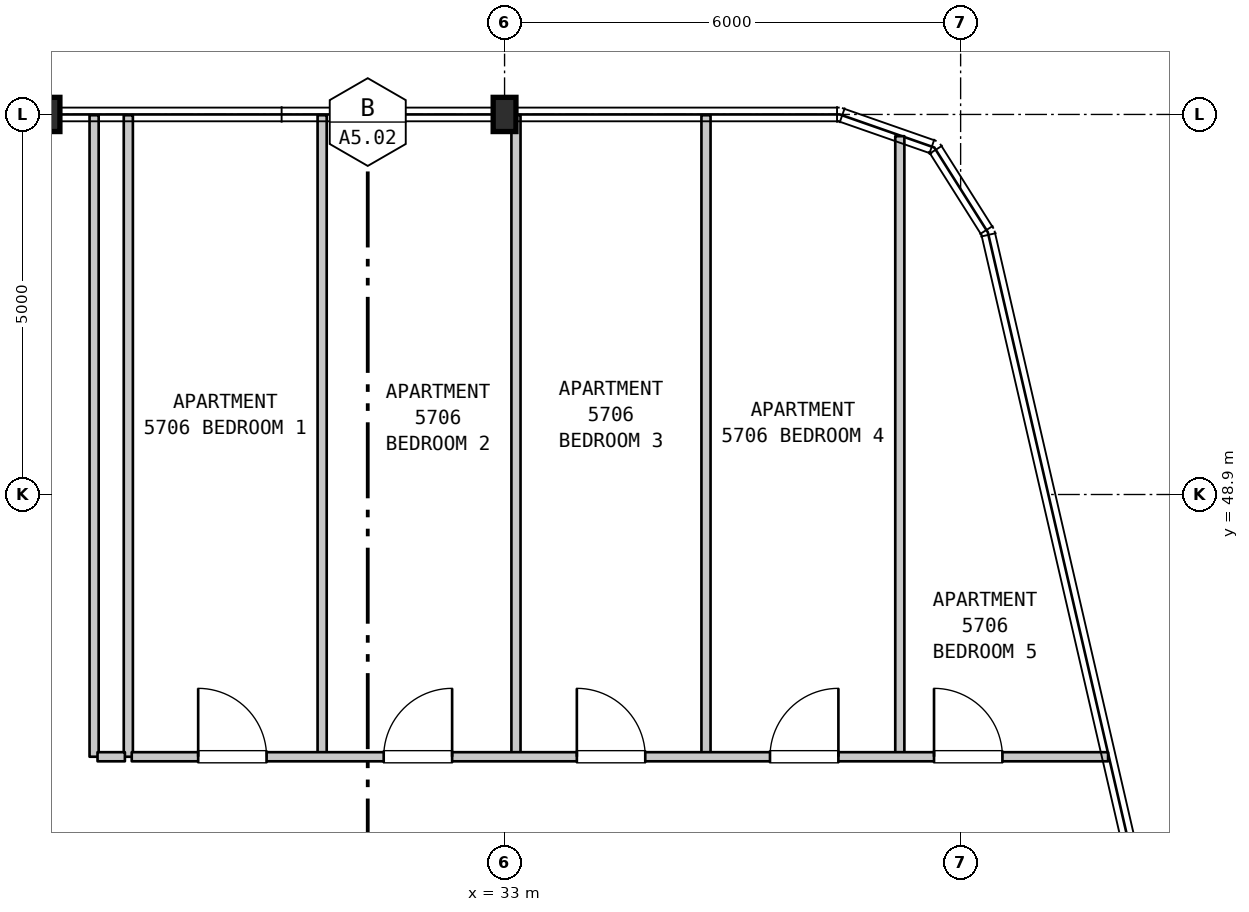
"""IFC4 building model, lengths in metres.
Left out: names, types, materials, properties, quantities, classifications, styles, units other than length and angle.
Written with IfcOpenShell. Run it as: python <this file> out.ifc"""

import sys

from ifc_helpers import new_model, si_unit, direction, frame, frame_2d, origin, origin_2d, place, context, subcontext, project, spatial, rectangle, i_section, extrude, element, fill, save


model = new_model("IFC4")
c1 = context("Model", 3, precision=1e-05, world=origin(), true_north=direction((0.0, 1.0)))
c2 = subcontext(c1, "Body", "Model", "MODEL_VIEW")
j1 = project(units=[si_unit("LENGTHUNIT", "METRE"), si_unit("PLANEANGLEUNIT", "RADIAN")], contexts=[c1])
p1 = place(None, origin())
s1 = spatial("IfcSite", under=j1, at=p1, CompositionType="ELEMENT")
p2 = place(p1, origin())
s2 = spatial("IfcBuilding", under=s1, at=p2, CompositionType="ELEMENT")
p3 = place(p2, frame((0.0, 0.0, 230.2)))
s3 = spatial("IfcBuildingStorey", under=s2, at=p3, CompositionType="ELEMENT", Elevation=230.2)
for number, where, z_axis, x_axis in (
    (1, (27.0, 53.9, 0.0), (0.0, 0.0, 1.0), (1.0, 0.0, 0.0)),
    (2, (33.0, 53.9, 0.0), (0.0, 0.0, 1.0), (1.0, 0.0, 0.0)),
):
    element("IfcColumn", number, at=place(p3, frame(where, z_axis=z_axis, x_axis=x_axis)), inside=s3, PredefinedType="COLUMN", context=c2, shape_type="SweptSolid", body=[
        extrude(i_section(OverallWidth=0.3, OverallDepth=0.45, WebThickness=0.014, FlangeThickness=0.026, FilletRadius=0.027, at=origin_2d()), origin(), (0.0, 0.0, 1.0), 3.7),
    ])
for number, where, z_axis, x_axis in (
    (3, (27.6, 45.45, 0.0), (0.0, 0.0, 1.0), (0.0, 1.0, 0.0)),
    (4, (28.05, 45.45, 0.0), (0.0, 0.0, 1.0), (0.0, 1.0, 0.0)),
    (5, (30.6, 45.45, 0.0), (0.0, 0.0, 1.0), (0.0, 1.0, 0.0)),
):
    element("IfcWall", number, at=place(p3, frame(where, z_axis=z_axis, x_axis=x_axis)), inside=s3, PredefinedType="PARTITIONING", context=c2, shape_type="SweptSolid", body=[
        extrude(rectangle(XDim=8.44, YDim=0.12, at=frame_2d((4.22, 0.0))), origin(), (0.0, 0.0, 1.0), 3.39),
    ])
p4 = place(p3, frame((33.15, 45.45, 0.0), z_axis=(0.0, 0.0, 1.0), x_axis=(0.0, 1.0, 0.0)))
e6 = element("IfcWall", 6, at=p4, inside=s3, PredefinedType="PARTITIONING", context=c2, shape_type="SweptSolid", body=[
    extrude(rectangle(XDim=8.44, YDim=0.12, at=frame_2d((4.22, 0.0))), origin(), (0.0, 0.0, 1.0), 2.79),
])
p5 = place(p3, frame((35.65, 45.45, 0.0), z_axis=(0.0, 0.0, 1.0), x_axis=(0.0, 1.0, 0.0)))
e7 = element("IfcWall", 7, at=p5, inside=s3, PredefinedType="PARTITIONING", context=c2, shape_type="SweptSolid", body=[
    extrude(rectangle(XDim=8.44, YDim=0.12, at=frame_2d((4.22, 0.0))), origin(), (0.0, 0.0, 1.0), 3.39),
])
p6 = place(p3, frame((38.2, 45.45, 0.0), z_axis=(0.0, 0.0, 1.0), x_axis=(0.0, 1.0, 0.0)))
e8 = element("IfcWall", 8, at=p6, inside=s3, PredefinedType="PARTITIONING", context=c2, shape_type="SweptSolid", body=[
    extrude(rectangle(XDim=8.164, YDim=0.12, at=frame_2d((4.082, 0.0))), origin(), (0.0, 0.0, 1.0), 3.39),
])
p7 = place(p3, frame((27.645, 45.45, 0.0), z_axis=(0.0, 0.0, 1.0), x_axis=(1.0, 0.0, 0.0)))
e9 = element("IfcWall", 9, at=p7, inside=s3, PredefinedType="PARTITIONING", context=c2, shape_type="SweptSolid", body=[
    extrude(rectangle(XDim=0.36, YDim=0.12, at=frame_2d((0.18, 0.0))), origin(), (0.0, 0.0, 1.0), 3.39),
])
p8 = place(p3, frame((28.095, 45.45, 0.0), z_axis=(0.0, 0.0, 1.0), x_axis=(1.0, 0.0, 0.0)))
e10 = element("IfcWall", 10, at=p8, inside=s3, PredefinedType="PARTITIONING", context=c2, shape_type="SweptSolid", body=[
    extrude(rectangle(XDim=12.845, YDim=0.12, at=frame_2d((6.422, 0.0))), origin(), (0.0, 0.0, 1.0), 3.39),
])
p9 = place(p8, frame((0.874, 0.0, 0.0)))
e11 = element("IfcOpeningElement", 11, at=p9, cuts=e10, PredefinedType="OPENING", context=c2, shape_type="SweptSolid", body=[
    extrude(rectangle(XDim=0.9, YDim=2.15, at=frame_2d((0.45, 1.075))), frame((0.0, 0.07, 0.0), z_axis=(0.0, -1.0, 0.0), x_axis=(1.0, 0.0, 0.0)), (0.0, 0.0, 1.0), 0.14),
])
p10 = place(p8, frame((3.315, 0.0, 0.0)))
e12 = element("IfcOpeningElement", 12, at=p10, cuts=e10, PredefinedType="OPENING", context=c2, shape_type="SweptSolid", body=[
    extrude(rectangle(XDim=0.9, YDim=2.15, at=frame_2d((0.45, 1.075))), frame((0.0, 0.07, 0.0), z_axis=(0.0, -1.0, 0.0), x_axis=(1.0, 0.0, 0.0)), (0.0, 0.0, 1.0), 0.14),
])
p11 = place(p8, frame((5.856, 0.0, 0.0)))
e13 = element("IfcOpeningElement", 13, at=p11, cuts=e10, PredefinedType="OPENING", context=c2, shape_type="SweptSolid", body=[
    extrude(rectangle(XDim=0.9, YDim=2.15, at=frame_2d((0.45, 1.075))), frame((0.0, 0.07, 0.0), z_axis=(0.0, -1.0, 0.0), x_axis=(1.0, 0.0, 0.0)), (0.0, 0.0, 1.0), 0.14),
])
p12 = place(p8, frame((8.397, 0.0, 0.0)))
e14 = element("IfcOpeningElement", 14, at=p12, cuts=e10, PredefinedType="OPENING", context=c2, shape_type="SweptSolid", body=[
    extrude(rectangle(XDim=0.9, YDim=2.15, at=frame_2d((0.45, 1.075))), frame((0.0, 0.07, 0.0), z_axis=(0.0, -1.0, 0.0), x_axis=(1.0, 0.0, 0.0)), (0.0, 0.0, 1.0), 0.14),
])
p13 = place(p8, frame((10.555, 0.0, 0.0)))
e15 = element("IfcOpeningElement", 15, at=p13, cuts=e10, PredefinedType="OPENING", context=c2, shape_type="SweptSolid", body=[
    extrude(rectangle(XDim=0.9, YDim=2.15, at=frame_2d((0.45, 1.075))), frame((0.0, 0.07, 0.0), z_axis=(0.0, -1.0, 0.0), x_axis=(1.0, 0.0, 0.0)), (0.0, 0.0, 1.0), 0.14),
])
p14 = place(p9, origin())
e16 = element("IfcDoor", 16, at=p14, inside=s3, OperationType="SINGLE_SWING_LEFT", PredefinedType="DOOR", context=c2, shape_type="SweptSolid", body=[
    extrude(rectangle(XDim=0.9, YDim=2.15, at=frame_2d((0.45, 1.075))), frame((0.0, 0.025, 0.0), z_axis=(0.0, -1.0, 0.0), x_axis=(1.0, 0.0, 0.0)), (0.0, 0.0, 1.0), 0.05),
])
fill(e11, e16)
p15 = place(p10, origin())
e17 = element("IfcDoor", 17, at=p15, inside=s3, OperationType="SINGLE_SWING_RIGHT", PredefinedType="DOOR", context=c2, shape_type="SweptSolid", body=[
    extrude(rectangle(XDim=0.9, YDim=2.15, at=frame_2d((0.45, 1.075))), frame((0.0, 0.025, 0.0), z_axis=(0.0, -1.0, 0.0), x_axis=(1.0, 0.0, 0.0)), (0.0, 0.0, 1.0), 0.05),
])
fill(e12, e17)
p16 = place(p11, origin())
e18 = element("IfcDoor", 18, at=p16, inside=s3, OperationType="SINGLE_SWING_LEFT", PredefinedType="DOOR", context=c2, shape_type="SweptSolid", body=[
    extrude(rectangle(XDim=0.9, YDim=2.15, at=frame_2d((0.45, 1.075))), frame((0.0, 0.025, 0.0), z_axis=(0.0, -1.0, 0.0), x_axis=(1.0, 0.0, 0.0)), (0.0, 0.0, 1.0), 0.05),
])
fill(e13, e18)
p17 = place(p12, origin())
e19 = element("IfcDoor", 19, at=p17, inside=s3, OperationType="SINGLE_SWING_RIGHT", PredefinedType="DOOR", context=c2, shape_type="SweptSolid", body=[
    extrude(rectangle(XDim=0.9, YDim=2.15, at=frame_2d((0.45, 1.075))), frame((0.0, 0.025, 0.0), z_axis=(0.0, -1.0, 0.0), x_axis=(1.0, 0.0, 0.0)), (0.0, 0.0, 1.0), 0.05),
])
fill(e14, e19)
p18 = place(p13, origin())
e20 = element("IfcDoor", 20, at=p18, inside=s3, OperationType="SINGLE_SWING_LEFT", PredefinedType="DOOR", context=c2, shape_type="SweptSolid", body=[
    extrude(rectangle(XDim=0.9, YDim=2.15, at=frame_2d((0.45, 1.075))), frame((0.0, 0.025, 0.0), z_axis=(0.0, -1.0, 0.0), x_axis=(1.0, 0.0, 0.0)), (0.0, 0.0, 1.0), 0.05),
])
fill(e15, e20)
save(model, sys.argv[1])
